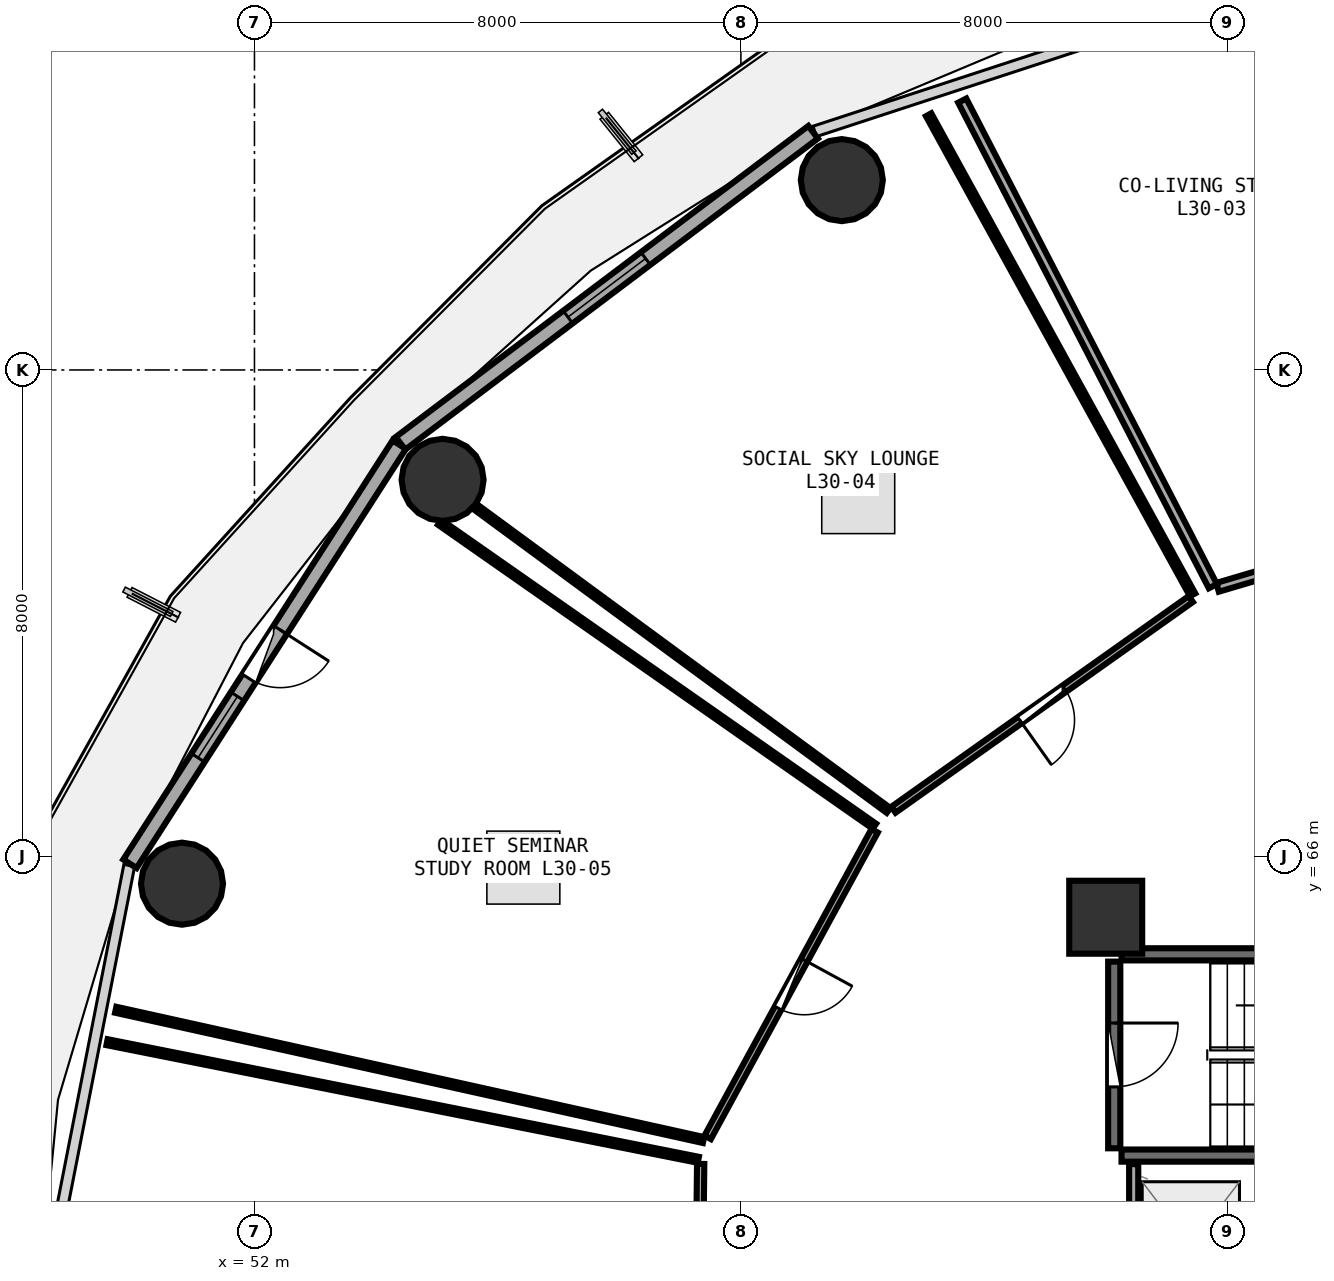
"""IFC4 building model, lengths in metres.
Left out: names, types, materials, properties, quantities, classifications, styles, units other than length and angle.
Written with IfcOpenShell. Run it as: python <this file> out.ifc"""

import sys

from ifc_helpers import new_model, si_unit, direction, frame, frame_2d, origin, origin_2d, place, context, subcontext, project, spatial, rectangle, circle, extrude, element, fill, save


model = new_model("IFC4")
c1 = context("Model", 3, precision=1e-05, world=origin(), true_north=direction((0.0, 1.0)))
c2 = subcontext(c1, "Body", "Model", "MODEL_VIEW")
j1 = project(units=[si_unit("LENGTHUNIT", "METRE"), si_unit("PLANEANGLEUNIT", "RADIAN")], contexts=[c1])
p1 = place(None, origin())
s1 = spatial("IfcSite", under=j1, at=p1, CompositionType="ELEMENT")
p2 = place(p1, origin())
s2 = spatial("IfcBuilding", under=s1, at=p2, CompositionType="ELEMENT")
p3 = place(p2, frame((0.0, 0.0, 117.6)))
s3 = spatial("IfcBuildingStorey", under=s2, at=p3, CompositionType="ELEMENT", Elevation=117.6)
p4 = place(p3, frame((66.0, 65.0, 0.0), z_axis=(0.0, 0.0, 1.0), x_axis=(1.0, 0.0, 0.0)))
e1 = element("IfcColumn", 1, at=p4, inside=s3, PredefinedType="PILASTER", context=c2, shape_type="SweptSolid", body=[
    extrude(rectangle(XDim=1.2, YDim=1.2, at=origin_2d()), origin(), (0.0, 0.0, 1.0), 3.75),
])
for number, where, z_axis, x_axis in (
    (2, (61.66, 77.122, 0.0), (0.0, 0.0, 1.0), (1.0, 0.0, 0.0)),
    (3, (55.094, 72.193, 0.0), (0.0, 0.0, 1.0), (1.0, 0.0, 0.0)),
    (4, (50.808, 65.552, 0.0), (0.0, 0.0, 1.0), (1.0, 0.0, 0.0)),
):
    element("IfcColumn", number, at=place(p3, frame(where, z_axis=z_axis, x_axis=x_axis)), inside=s3, PredefinedType="COLUMN", context=c2, shape_type="SweptSolid", body=[
        extrude(circle(Radius=0.675, at=origin_2d()), origin(), (0.0, 0.0, 1.0), 3.75),
    ])
p5 = place(p3, frame((61.188, 77.91, 0.0), z_axis=(0.0, 0.0, 1.0), x_axis=(-0.798501507879, -0.601992808857, 0.0)))
e5 = element("IfcWall", 5, at=p5, inside=s3, PredefinedType="SOLIDWALL", context=c2, shape_type="SweptSolid", body=[
    extrude(rectangle(XDim=8.499, YDim=0.26, at=frame_2d((4.25, 0.0))), origin(), (0.0, 0.0, 1.0), 3.475),
])
p6 = place(p5, frame((3.45, 0.0, 0.85)))
e6 = element("IfcOpeningElement", 6, at=p6, cuts=e5, PredefinedType="OPENING", context=c2, shape_type="SweptSolid", body=[
    extrude(rectangle(XDim=1.6, YDim=1.45, at=frame_2d((0.8, 0.725))), frame((0.0, 0.14, 0.0), z_axis=(0.0, -1.0, 0.0), x_axis=(1.0, 0.0, 0.0)), (0.0, 0.0, 1.0), 0.28),
])
p7 = place(p3, frame((54.381, 72.771, 0.0), z_axis=(0.0, 0.0, 1.0), x_axis=(-0.540620528459, -0.841266571432, 0.0)))
e7 = element("IfcWall", 7, at=p7, inside=s3, PredefinedType="SOLIDWALL", context=c2, shape_type="SweptSolid", body=[
    extrude(rectangle(XDim=8.193, YDim=0.26, at=frame_2d((4.096, 0.0))), origin(), (0.0, 0.0, 1.0), 3.475),
])
p8 = place(p7, frame((3.621, 0.0, 0.0)))
e8 = element("IfcOpeningElement", 8, at=p8, cuts=e7, PredefinedType="OPENING", context=c2, shape_type="SweptSolid", body=[
    extrude(rectangle(XDim=0.95, YDim=2.1, at=frame_2d((0.475, 1.05))), frame((0.0, 0.14, 0.0), z_axis=(0.0, -1.0, 0.0), x_axis=(1.0, 0.0, 0.0)), (0.0, 0.0, 1.0), 0.28),
])
p9 = place(p7, frame((4.921, 0.0, 0.85)))
e9 = element("IfcOpeningElement", 9, at=p9, cuts=e7, PredefinedType="OPENING", context=c2, shape_type="SweptSolid", body=[
    extrude(rectangle(XDim=1.2, YDim=1.45, at=frame_2d((0.6, 0.725))), frame((0.0, 0.14, 0.0), z_axis=(0.0, -1.0, 0.0), x_axis=(1.0, 0.0, 0.0)), (0.0, 0.0, 1.0), 0.28),
])
for number, where, z_axis, x_axis in (
    (10, (66.26, 61.08, 0.0), (0.0, 0.0, 1.0), (1.0, 0.0, 0.0)),
    (11, (73.42, 64.39, 0.0), (0.0, 0.0, 1.0), (-1.0, 0.0, 0.0)),
):
    element("IfcWall", number, at=place(p3, frame(where, z_axis=z_axis, x_axis=x_axis)), inside=s3, PredefinedType="SHEAR", context=c2, shape_type="SweptSolid", body=[
        extrude(rectangle(XDim=7.16, YDim=0.2, at=frame_2d((3.58, 0.0))), origin(), (0.0, 0.0, 1.0), 3.49),
    ])
p10 = place(p3, frame((66.14, 64.27, 0.0), z_axis=(0.0, 0.0, 1.0), x_axis=(0.0, -1.0, 0.0)))
e12 = element("IfcWall", 12, at=p10, inside=s3, PredefinedType="SHEAR", context=c2, shape_type="SweptSolid", body=[
    extrude(rectangle(XDim=3.07, YDim=0.2, at=frame_2d((1.535, 0.0))), origin(), (0.0, 0.0, 1.0), 3.49),
])
p11 = place(p10, frame((1.01, 0.0, 0.0)))
e13 = element("IfcOpeningElement", 13, at=p11, cuts=e12, PredefinedType="OPENING", context=c2, shape_type="SweptSolid", body=[
    extrude(rectangle(XDim=1.05, YDim=2.1, at=frame_2d((0.525, 1.05))), frame((0.0, 0.11, 0.0), z_axis=(0.0, -1.0, 0.0), x_axis=(1.0, 0.0, 0.0)), (0.0, 0.0, 1.0), 0.22),
])
p12 = place(p3, frame((66.46, 58.48, 0.0), z_axis=(0.0, 0.0, 1.0), x_axis=(0.0, 1.0, 0.0)))
e14 = element("IfcWall", 14, at=p12, inside=s3, PredefinedType="PARTITIONING", context=c2, shape_type="SweptSolid", body=[
    extrude(rectangle(XDim=2.46, YDim=0.15, at=frame_2d((1.23, 0.0))), origin(), (0.0, 0.0, 1.0), 3.48),
])
p13 = place(p3, frame((70.9, 71.331, 0.0), z_axis=(0.0, 0.0, 1.0), x_axis=(-0.958905255717, -0.283726471373, 0.0)))
e15 = element("IfcWall", 15, at=p13, inside=s3, PredefinedType="PARTITIONING", context=c2, shape_type="SweptSolid", body=[
    extrude(rectangle(XDim=3.193, YDim=0.15, at=frame_2d((1.597, 0.0))), origin(), (0.0, 0.0, 1.0), 2.925),
])
p14 = place(p13, frame((1.122, 0.0, 0.0)))
e16 = element("IfcOpeningElement", 16, at=p14, cuts=e15, PredefinedType="OPENING", context=c2, shape_type="SweptSolid", body=[
    extrude(rectangle(XDim=0.95, YDim=2.08, at=frame_2d((0.475, 1.04))), frame((0.0, 0.085, 0.0), z_axis=(0.0, -1.0, 0.0), x_axis=(1.0, 0.0, 0.0)), (0.0, 0.0, 1.0), 0.17),
])
p15 = place(p3, frame((67.399, 70.232, 0.0), z_axis=(0.0, 0.0, 1.0), x_axis=(-0.815932399176, -0.578147316846, 0.0)))
e17 = element("IfcWall", 17, at=p15, inside=s3, PredefinedType="PARTITIONING", context=c2, shape_type="SweptSolid", body=[
    extrude(rectangle(XDim=5.993, YDim=0.12, at=frame_2d((2.997, 0.0))), origin(), (0.0, 0.0, 1.0), 2.925),
])
p16 = place(p15, frame((2.546, 0.0, 0.0)))
e18 = element("IfcOpeningElement", 18, at=p16, cuts=e17, PredefinedType="OPENING", context=c2, shape_type="SweptSolid", body=[
    extrude(rectangle(XDim=0.9, YDim=2.08, at=frame_2d((0.45, 1.04))), frame((0.0, 0.07, 0.0), z_axis=(0.0, -1.0, 0.0), x_axis=(1.0, 0.0, 0.0)), (0.0, 0.0, 1.0), 0.14),
])
p17 = place(p3, frame((62.199, 66.421, 0.0), z_axis=(0.0, 0.0, 1.0), x_axis=(-0.478256103777, -0.878220416069, 0.0)))
e19 = element("IfcWall", 19, at=p17, inside=s3, PredefinedType="PARTITIONING", context=c2, shape_type="SweptSolid", body=[
    extrude(rectangle(XDim=5.741, YDim=0.12, at=frame_2d((2.871, 0.0))), origin(), (0.0, 0.0, 1.0), 2.925),
])
p18 = place(p17, frame((2.42, 0.0, 0.0)))
e20 = element("IfcOpeningElement", 20, at=p18, cuts=e19, PredefinedType="OPENING", context=c2, shape_type="SweptSolid", body=[
    extrude(rectangle(XDim=0.9, YDim=2.08, at=frame_2d((0.45, 1.04))), frame((0.0, 0.07, 0.0), z_axis=(0.0, -1.0, 0.0), x_axis=(1.0, 0.0, 0.0)), (0.0, 0.0, 1.0), 0.14),
])
p19 = place(p3, frame((59.338, 60.943, 0.0), z_axis=(0.0, 0.0, 1.0), x_axis=(-0.010989779386, -0.999939610551, 0.0)))
e21 = element("IfcWall", 21, at=p19, inside=s3, PredefinedType="PARTITIONING", context=c2, shape_type="SweptSolid", body=[
    extrude(rectangle(XDim=5.62, YDim=0.12, at=frame_2d((2.81, 0.0))), origin(), (0.0, 0.0, 1.0), 2.925),
])
p20 = place(p19, frame((2.36, 0.0, 0.0)))
e22 = element("IfcOpeningElement", 22, at=p20, cuts=e21, PredefinedType="OPENING", context=c2, shape_type="SweptSolid", body=[
    extrude(rectangle(XDim=0.9, YDim=2.08, at=frame_2d((0.45, 1.04))), frame((0.0, 0.07, 0.0), z_axis=(0.0, -1.0, 0.0), x_axis=(1.0, 0.0, 0.0)), (0.0, 0.0, 1.0), 0.14),
])
p21 = place(p3, frame((67.763, 70.444, 0.0), z_axis=(0.0, 0.0, 1.0), x_axis=(-0.458694817529, 0.888593869196, 0.0)))
e23 = element("IfcWall", 23, at=p21, inside=s3, PredefinedType="PARTITIONING", context=c2, shape_type="SweptSolid", body=[
    extrude(rectangle(XDim=8.987, YDim=0.15, at=frame_2d((4.494, 0.0))), origin(), (0.0, 0.0, 1.0), 2.975),
])
p22 = place(p3, frame((62.428, 66.757, 0.0), z_axis=(0.0, 0.0, 1.0), x_axis=(-0.805852200235, 0.592116737963, 0.0)))
e24 = element("IfcWall", 24, at=p22, inside=s3, PredefinedType="PARTITIONING", context=c2, shape_type="SweptSolid", body=[
    extrude(rectangle(XDim=8.43, YDim=0.1, at=frame_2d((4.215, 0.0))), origin(), (0.0, 0.0, 1.0), 2.925),
])
p23 = place(p3, frame((63.087, 78.197, 0.0), z_axis=(0.0, 0.0, 1.0), x_axis=(0.481837612944, -0.876260529039, 0.0)))
e25 = element("IfcWall", 25, at=p23, inside=s3, PredefinedType="PARTITIONING", context=c2, shape_type="SweptSolid", body=[
    extrude(rectangle(XDim=9.01, YDim=0.1, at=frame_2d((4.505, 0.0))), origin(), (0.0, 0.0, 1.0), 2.975),
])
p24 = place(p3, frame((59.386, 61.336, 0.0), z_axis=(0.0, 0.0, 1.0), x_axis=(-0.976312199438, 0.216366562178, 0.0)))
e26 = element("IfcWall", 26, at=p24, inside=s3, PredefinedType="PARTITIONING", context=c2, shape_type="SweptSolid", body=[
    extrude(rectangle(XDim=9.903, YDim=0.1, at=frame_2d((4.951, 0.0))), origin(), (0.0, 0.0, 1.0), 2.975),
])
p25 = place(p3, frame((55.047, 71.494, 0.0), z_axis=(0.0, 0.0, 1.0), x_axis=(0.8195552972, -0.573000100201, 0.0)))
e27 = element("IfcWall", 27, at=p25, inside=s3, PredefinedType="PARTITIONING", context=c2, shape_type="SweptSolid", body=[
    extrude(rectangle(XDim=8.722, YDim=0.1, at=frame_2d((4.361, 0.0))), origin(), (0.0, 0.0, 1.0), 3.175),
])
p26 = place(p3, frame((49.575, 62.945, 0.0), z_axis=(0.0, 0.0, 1.0), x_axis=(0.980780933509, -0.195112174059, 0.0)))
e28 = element("IfcWall", 28, at=p26, inside=s3, PredefinedType="PARTITIONING", context=c2, shape_type="SweptSolid", body=[
    extrude(rectangle(XDim=9.915, YDim=0.1, at=frame_2d((4.958, 0.0))), origin(), (0.0, 0.0, 1.0), 2.975),
])
p27 = place(p6, origin())
e29 = element("IfcWindow", 29, at=p27, inside=s3, PartitioningType="SINGLE_PANEL", PredefinedType="WINDOW", context=c2, shape_type="SweptSolid", body=[
    extrude(rectangle(XDim=1.6, YDim=1.45, at=frame_2d((0.8, 0.725))), frame((0.0, 0.03, 0.0), z_axis=(0.0, -1.0, 0.0), x_axis=(1.0, 0.0, 0.0)), (0.0, 0.0, 1.0), 0.06),
])
fill(e6, e29)
p28 = place(p8, frame((0.95, 0.0, 0.0), z_axis=(0.0, 0.0, 1.0), x_axis=(-1.0, 0.0, 0.0)))
e30 = element("IfcDoor", 30, at=p28, inside=s3, OperationType="SINGLE_SWING_RIGHT", PredefinedType="DOOR", context=c2, shape_type="SweptSolid", body=[
    extrude(rectangle(XDim=0.95, YDim=2.1, at=frame_2d((0.475, 1.05))), frame((0.0, 0.025, 0.0), z_axis=(0.0, -1.0, 0.0), x_axis=(1.0, 0.0, 0.0)), (0.0, 0.0, 1.0), 0.05),
])
fill(e8, e30)
p29 = place(p9, origin())
e31 = element("IfcWindow", 31, at=p29, inside=s3, PartitioningType="SINGLE_PANEL", PredefinedType="WINDOW", context=c2, shape_type="SweptSolid", body=[
    extrude(rectangle(XDim=1.2, YDim=1.45, at=frame_2d((0.6, 0.725))), frame((0.0, 0.03, 0.0), z_axis=(0.0, -1.0, 0.0), x_axis=(1.0, 0.0, 0.0)), (0.0, 0.0, 1.0), 0.06),
])
fill(e9, e31)
p30 = place(p11, origin())
e32 = element("IfcDoor", 32, at=p30, inside=s3, OperationType="SINGLE_SWING_LEFT", PredefinedType="DOOR", context=c2, shape_type="SweptSolid", body=[
    extrude(rectangle(XDim=1.05, YDim=2.1, at=frame_2d((0.525, 1.05))), frame((0.0, 0.025, 0.0), z_axis=(0.0, -1.0, 0.0), x_axis=(1.0, 0.0, 0.0)), (0.0, 0.0, 1.0), 0.05),
])
fill(e13, e32)
p31 = place(p16, origin())
e33 = element("IfcDoor", 33, at=p31, inside=s3, OperationType="SINGLE_SWING_RIGHT", PredefinedType="DOOR", context=c2, shape_type="SweptSolid", body=[
    extrude(rectangle(XDim=0.9, YDim=2.08, at=frame_2d((0.45, 1.04))), frame((0.0, 0.025, 0.0), z_axis=(0.0, -1.0, 0.0), x_axis=(1.0, 0.0, 0.0)), (0.0, 0.0, 1.0), 0.05),
])
fill(e18, e33)
p32 = place(p18, origin())
e34 = element("IfcDoor", 34, at=p32, inside=s3, OperationType="SINGLE_SWING_LEFT", PredefinedType="DOOR", context=c2, shape_type="SweptSolid", body=[
    extrude(rectangle(XDim=0.9, YDim=2.08, at=frame_2d((0.45, 1.04))), frame((0.0, 0.025, 0.0), z_axis=(0.0, -1.0, 0.0), x_axis=(1.0, 0.0, 0.0)), (0.0, 0.0, 1.0), 0.05),
])
fill(e20, e34)
save(model, sys.argv[1])
